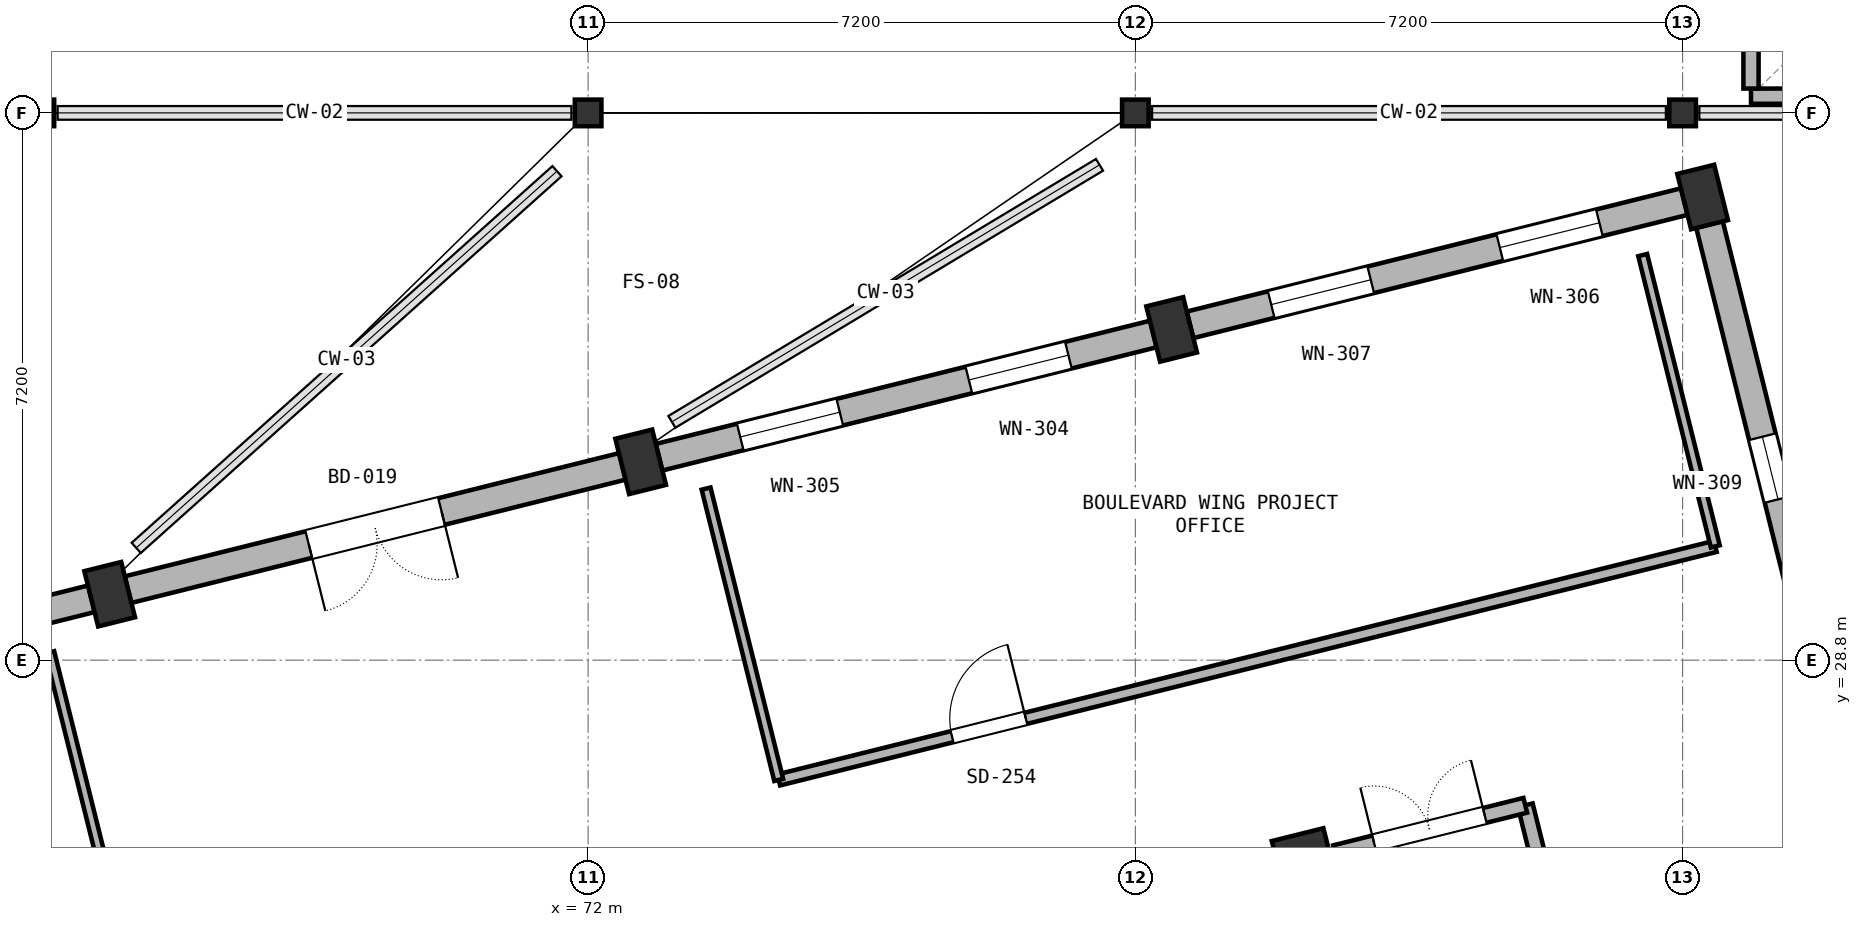
"""IFC4 building model, lengths in metres.
Left out: names, types, materials, properties, quantities, classifications, styles, units other than length and angle.
Written with IfcOpenShell. Run it as: python <this file> out.ifc"""

import sys

from ifc_helpers import new_model, si_unit, direction, frame, frame_2d, origin, origin_2d, place, context, subcontext, project, spatial, rectangle, i_section, extrude, element, fill, save


model = new_model("IFC4")
c1 = context("Model", 3, precision=1e-05, world=origin(), true_north=direction((0.0, 1.0)))
c2 = subcontext(c1, "Body", "Model", "MODEL_VIEW")
j1 = project(units=[si_unit("LENGTHUNIT", "METRE"), si_unit("PLANEANGLEUNIT", "RADIAN")], contexts=[c1])
p1 = place(None, origin())
s1 = spatial("IfcSite", under=j1, at=p1, CompositionType="ELEMENT")
p2 = place(p1, origin())
s2 = spatial("IfcBuilding", under=s1, at=p2, CompositionType="ELEMENT")
p3 = place(p2, frame((0.0, 0.0, 10.2)))
s3 = spatial("IfcBuildingStorey", under=s2, at=p3, CompositionType="ELEMENT", Elevation=10.2)
for number, where, z_axis, x_axis in (
    (1, (65.705, 29.667, 0.0), (0.0, 0.0, 1.0), (0.97, 0.242, 0.0)),
    (2, (72.691, 31.409, 0.0), (0.0, 0.0, 1.0), (0.97, 0.242, 0.0)),
):
    element("IfcColumn", number, at=place(p3, frame(where, z_axis=z_axis, x_axis=x_axis)), inside=s3, PredefinedType="COLUMN", context=c2, shape_type="SweptSolid", body=[
        extrude(rectangle(XDim=0.5, YDim=0.75, at=origin_2d()), origin(), (0.0, 0.0, 1.0), 4.2),
    ])
p4 = place(p3, frame((81.419, 26.165, 0.0), z_axis=(0.0, 0.0, 1.0), x_axis=(0.970295726276, 0.2419218956, 0.0)))
e3 = element("IfcColumn", 3, at=p4, inside=s3, PredefinedType="COLUMN", context=c2, shape_type="SweptSolid", body=[
    extrude(rectangle(XDim=0.7, YDim=0.7, at=origin_2d()), origin(), (0.0, 0.0, 1.0), 4.2),
])
for number, where, z_axis, x_axis in (
    (4, (79.677, 33.151, 0.0), (0.0, 0.0, 1.0), (0.97, 0.242, 0.0)),
    (5, (86.664, 34.893, 0.0), (0.0, 0.0, 1.0), (0.97, 0.242, 0.0)),
):
    element("IfcColumn", number, at=place(p3, frame(where, z_axis=z_axis, x_axis=x_axis)), inside=s3, PredefinedType="COLUMN", context=c2, shape_type="SweptSolid", body=[
        extrude(rectangle(XDim=0.5, YDim=0.75, at=origin_2d()), origin(), (0.0, 0.0, 1.0), 4.2),
    ])
for number, where, z_axis, x_axis in (
    (6, (64.8, 36.0, 0.0), (0.0, 0.0, 1.0), (1.0, 0.0, 0.0)),
    (7, (72.0, 36.0, 0.0), (0.0, 0.0, 1.0), (1.0, 0.0, 0.0)),
    (8, (79.2, 36.0, 0.0), (0.0, 0.0, 1.0), (1.0, 0.0, 0.0)),
    (9, (86.4, 36.0, 0.0), (0.0, 0.0, 1.0), (1.0, 0.0, 0.0)),
):
    element("IfcColumn", number, at=place(p3, frame(where, z_axis=z_axis, x_axis=x_axis)), inside=s3, PredefinedType="COLUMN", context=c2, shape_type="SweptSolid", body=[
        extrude(i_section(OverallWidth=0.35, OverallDepth=0.35, WebThickness=0.012, FlangeThickness=0.019, FilletRadius=0.02, at=origin_2d()), origin(), (0.0, 0.0, 1.0), 4.2),
    ])
p5 = place(p3, frame((92.7, 36.22, 0.0), z_axis=(0.0, 0.0, 1.0), x_axis=(-1.0, 0.0, 0.0)))
e10 = element("IfcWall", 10, at=p5, inside=s3, PredefinedType="PARTITIONING", context=c2, shape_type="SweptSolid", body=[
    extrude(rectangle(XDim=5.4, YDim=0.2, at=frame_2d((2.7, 0.0))), origin(), (0.0, 0.0, 1.0), 3.42),
])
p6 = place(p3, frame((87.3, 42.88, 0.0), z_axis=(0.0, 0.0, 1.0), x_axis=(0.0, -1.0, 0.0)))
e11 = element("IfcWall", 11, at=p6, inside=s3, PredefinedType="PARTITIONING", context=c2, shape_type="SweptSolid", body=[
    extrude(rectangle(XDim=6.56, YDim=0.2, at=frame_2d((3.28, 0.0))), origin(), (0.0, 0.0, 1.0), 3.42),
])
p7 = place(p3, frame((65.465, 29.608, 0.0), z_axis=(0.0, 0.0, 1.0), x_axis=(-0.970296540998, -0.241918627903, 0.0)))
e12 = element("IfcWall", 12, at=p7, inside=s3, PredefinedType="SOLIDWALL", context=c2, shape_type="SweptSolid", body=[
    extrude(rectangle(XDim=6.704, YDim=0.36, at=frame_2d((3.352, 0.0))), origin(), (0.0, 0.0, 1.0), 3.04),
])
p8 = place(p7, frame((1.152, 0.0, 0.65)))
e13 = element("IfcOpeningElement", 13, at=p8, cuts=e12, PredefinedType="OPENING", context=c2, shape_type="SweptSolid", body=[
    extrude(rectangle(XDim=1.35, YDim=2.15, at=frame_2d((0.675, 1.075))), frame((0.0, 0.19, 0.0), z_axis=(0.0, -1.0, 0.0), x_axis=(1.0, 0.0, 0.0)), (0.0, 0.0, 1.0), 0.38),
])
p9 = place(p7, frame((4.252, 0.0, 0.65)))
e14 = element("IfcOpeningElement", 14, at=p9, cuts=e12, PredefinedType="OPENING", context=c2, shape_type="SweptSolid", body=[
    extrude(rectangle(XDim=1.35, YDim=2.15, at=frame_2d((0.675, 1.075))), frame((0.0, 0.19, 0.0), z_axis=(0.0, -1.0, 0.0), x_axis=(1.0, 0.0, 0.0)), (0.0, 0.0, 1.0), 0.38),
])
p10 = place(p3, frame((72.451, 31.349, 0.0), z_axis=(0.0, 0.0, 1.0), x_axis=(-0.970296540998, -0.241918627903, 0.0)))
e15 = element("IfcWall", 15, at=p10, inside=s3, PredefinedType="SOLIDWALL", context=c2, shape_type="SweptSolid", body=[
    extrude(rectangle(XDim=6.704, YDim=0.36, at=frame_2d((3.352, 0.0))), origin(), (0.0, 0.0, 1.0), 2.58),
])
p11 = place(p10, frame((2.452, 0.0, 0.0)))
e16 = element("IfcOpeningElement", 16, at=p11, cuts=e15, PredefinedType="OPENING", context=c2, shape_type="SweptSolid", body=[
    extrude(rectangle(XDim=1.8, YDim=2.2, at=frame_2d((0.9, 1.1))), frame((0.0, 0.19, 0.0), z_axis=(0.0, -1.0, 0.0), x_axis=(1.0, 0.0, 0.0)), (0.0, 0.0, 1.0), 0.38),
])
p12 = place(p3, frame((79.437, 33.091, 0.0), z_axis=(0.0, 0.0, 1.0), x_axis=(-0.970296540998, -0.241918627903, 0.0)))
e17 = element("IfcWall", 17, at=p12, inside=s3, PredefinedType="SOLIDWALL", context=c2, shape_type="SweptSolid", body=[
    extrude(rectangle(XDim=6.704, YDim=0.36, at=frame_2d((3.352, 0.0))), origin(), (0.0, 0.0, 1.0), 3.04),
])
p13 = place(p12, frame((1.152, 0.0, 0.65)))
e18 = element("IfcOpeningElement", 18, at=p13, cuts=e17, PredefinedType="OPENING", context=c2, shape_type="SweptSolid", body=[
    extrude(rectangle(XDim=1.35, YDim=2.15, at=frame_2d((0.675, 1.075))), frame((0.0, 0.19, 0.0), z_axis=(0.0, -1.0, 0.0), x_axis=(1.0, 0.0, 0.0)), (0.0, 0.0, 1.0), 0.38),
])
p14 = place(p12, frame((4.252, 0.0, 0.65)))
e19 = element("IfcOpeningElement", 19, at=p14, cuts=e17, PredefinedType="OPENING", context=c2, shape_type="SweptSolid", body=[
    extrude(rectangle(XDim=1.35, YDim=2.15, at=frame_2d((0.675, 1.075))), frame((0.0, 0.19, 0.0), z_axis=(0.0, -1.0, 0.0), x_axis=(1.0, 0.0, 0.0)), (0.0, 0.0, 1.0), 0.38),
])
p15 = place(p3, frame((86.423, 34.833, 0.0), z_axis=(0.0, 0.0, 1.0), x_axis=(-0.970296540998, -0.241918627903, 0.0)))
e20 = element("IfcWall", 20, at=p15, inside=s3, PredefinedType="SOLIDWALL", context=c2, shape_type="SweptSolid", body=[
    extrude(rectangle(XDim=6.704, YDim=0.36, at=frame_2d((3.352, 0.0))), origin(), (0.0, 0.0, 1.0), 3.04),
])
p16 = place(p15, frame((1.152, 0.0, 0.65)))
e21 = element("IfcOpeningElement", 21, at=p16, cuts=e20, PredefinedType="OPENING", context=c2, shape_type="SweptSolid", body=[
    extrude(rectangle(XDim=1.35, YDim=2.15, at=frame_2d((0.675, 1.075))), frame((0.0, 0.19, 0.0), z_axis=(0.0, -1.0, 0.0), x_axis=(1.0, 0.0, 0.0)), (0.0, 0.0, 1.0), 0.38),
])
p17 = place(p15, frame((4.252, 0.0, 0.65)))
e22 = element("IfcOpeningElement", 22, at=p17, cuts=e20, PredefinedType="OPENING", context=c2, shape_type="SweptSolid", body=[
    extrude(rectangle(XDim=1.35, YDim=2.15, at=frame_2d((0.675, 1.075))), frame((0.0, 0.19, 0.0), z_axis=(0.0, -1.0, 0.0), x_axis=(1.0, 0.0, 0.0)), (0.0, 0.0, 1.0), 0.38),
])
p18 = place(p3, frame((88.315, 28.269, 0.0), z_axis=(0.0, 0.0, 1.0), x_axis=(-0.241939253206, 0.970291398374, 0.0)))
e23 = element("IfcWall", 23, at=p18, inside=s3, PredefinedType="SOLIDWALL", context=c2, shape_type="SweptSolid", body=[
    extrude(rectangle(XDim=6.454, YDim=0.36, at=frame_2d((3.227, 0.0))), origin(), (0.0, 0.0, 1.0), 3.04),
])
p19 = place(p18, frame((2.727, 0.0, 0.7)))
e24 = element("IfcOpeningElement", 24, at=p19, cuts=e23, PredefinedType="OPENING", context=c2, shape_type="SweptSolid", body=[
    extrude(rectangle(XDim=0.85, YDim=2.19, at=frame_2d((0.425, 1.095))), frame((0.0, 0.19, 0.0), z_axis=(0.0, -1.0, 0.0), x_axis=(1.0, 0.0, 0.0)), (0.0, 0.0, 1.0), 0.38),
])
p20 = place(p3, frame((86.072, 19.905, 0.0), z_axis=(0.0, 0.0, 1.0), x_axis=(-0.241937193493, 0.970291911955, 0.0)))
e25 = element("IfcWall", 25, at=p20, inside=s3, PredefinedType="PARTITIONING", context=c2, shape_type="SweptSolid", body=[
    extrude(rectangle(XDim=7.2, YDim=0.2, at=frame_2d((3.6, 0.0))), origin(), (0.0, 0.0, 1.0), 3.08),
])
p21 = place(p3, frame((84.33, 26.891, 0.0), z_axis=(0.0, 0.0, 1.0), x_axis=(-0.970309259708, -0.2418676095, 0.0)))
e26 = element("IfcWall", 26, at=p21, inside=s3, PredefinedType="PARTITIONING", context=c2, shape_type="SweptSolid", body=[
    extrude(rectangle(XDim=2.58, YDim=0.2, at=frame_2d((1.29, 0.0))), origin(), (0.0, 0.0, 1.0), 3.08),
])
p22 = place(p21, frame((0.55, 0.0, 0.0)))
e27 = element("IfcOpeningElement", 27, at=p22, cuts=e26, PredefinedType="OPENING", context=c2, shape_type="SweptSolid", body=[
    extrude(rectangle(XDim=1.5, YDim=2.2, at=frame_2d((0.75, 1.1))), frame((0.0, 0.11, 0.0), z_axis=(0.0, -1.0, 0.0), x_axis=(1.0, 0.0, 0.0)), (0.0, 0.0, 1.0), 0.22),
])
p23 = place(p3, frame((64.917, 28.904, 0.0), z_axis=(0.0, 0.0, 1.0), x_axis=(0.241924747697, -0.970295015164, 0.0)))
e28 = element("IfcWall", 28, at=p23, inside=s3, PredefinedType="PARTITIONING", context=c2, shape_type="SweptSolid", body=[
    extrude(rectangle(XDim=3.95, YDim=0.12, at=frame_2d((1.975, 0.0))), origin(), (0.0, 0.0, 1.0), 3.08),
])
p24 = place(p3, frame((74.508, 27.225, 0.0), z_axis=(0.0, 0.0, 1.0), x_axis=(0.970298350757, 0.241911369139, 0.0)))
e29 = element("IfcWall", 29, at=p24, inside=s3, PredefinedType="PARTITIONING", context=c2, shape_type="SweptSolid", body=[
    extrude(rectangle(XDim=12.7, YDim=0.15, at=frame_2d((6.35, 0.0))), origin(), (0.0, 0.0, 1.0), 3.08),
])
p25 = place(p24, frame((2.35, 0.0, 0.0)))
e30 = element("IfcOpeningElement", 30, at=p25, cuts=e29, PredefinedType="OPENING", context=c2, shape_type="SweptSolid", body=[
    extrude(rectangle(XDim=1.0, YDim=2.15, at=frame_2d((0.5, 1.075))), frame((0.0, 0.085, 0.0), z_axis=(0.0, -1.0, 0.0), x_axis=(1.0, 0.0, 0.0)), (0.0, 0.0, 1.0), 0.17),
])
p26 = place(p3, frame((74.508, 27.225, 0.0), z_axis=(0.0, 0.0, 1.0), x_axis=(-0.241924747697, 0.970295015164, 0.0)))
e31 = element("IfcWall", 31, at=p26, inside=s3, PredefinedType="PARTITIONING", context=c2, shape_type="SweptSolid", body=[
    extrude(rectangle(XDim=3.95, YDim=0.12, at=frame_2d((1.975, 0.0))), origin(), (0.0, 0.0, 1.0), 3.08),
])
p27 = place(p3, frame((85.875, 34.13, 0.0), z_axis=(0.0, 0.0, 1.0), x_axis=(0.241910239337, -0.970298632434, 0.0)))
e32 = element("IfcWall", 32, at=p27, inside=s3, PredefinedType="PARTITIONING", context=c2, shape_type="SweptSolid", body=[
    extrude(rectangle(XDim=3.95, YDim=0.12, at=frame_2d((1.975, 0.0))), origin(), (0.0, 0.0, 1.0), 3.08),
])
p28 = place(p11, origin())
e33 = element("IfcDoor", 33, at=p28, inside=s3, OperationType="DOUBLE_DOOR_SINGLE_SWING", PredefinedType="DOOR", context=c2, shape_type="SweptSolid", body=[
    extrude(rectangle(XDim=1.8, YDim=2.2, at=frame_2d((0.9, 1.1))), frame((0.0, 0.025, 0.0), z_axis=(0.0, -1.0, 0.0), x_axis=(1.0, 0.0, 0.0)), (0.0, 0.0, 1.0), 0.05),
])
fill(e16, e33)
p29 = place(p13, origin())
e34 = element("IfcWindow", 34, at=p29, inside=s3, PartitioningType="DOUBLE_PANEL_VERTICAL", PredefinedType="WINDOW", context=c2, shape_type="SweptSolid", body=[
    extrude(rectangle(XDim=1.35, YDim=2.15, at=frame_2d((0.675, 1.075))), frame((0.0, 0.03, 0.0), z_axis=(0.0, -1.0, 0.0), x_axis=(1.0, 0.0, 0.0)), (0.0, 0.0, 1.0), 0.06),
])
fill(e18, e34)
p30 = place(p14, origin())
e35 = element("IfcWindow", 35, at=p30, inside=s3, PartitioningType="DOUBLE_PANEL_VERTICAL", PredefinedType="WINDOW", context=c2, shape_type="SweptSolid", body=[
    extrude(rectangle(XDim=1.35, YDim=2.15, at=frame_2d((0.675, 1.075))), frame((0.0, 0.03, 0.0), z_axis=(0.0, -1.0, 0.0), x_axis=(1.0, 0.0, 0.0)), (0.0, 0.0, 1.0), 0.06),
])
fill(e19, e35)
p31 = place(p16, origin())
e36 = element("IfcWindow", 36, at=p31, inside=s3, PartitioningType="DOUBLE_PANEL_VERTICAL", PredefinedType="WINDOW", context=c2, shape_type="SweptSolid", body=[
    extrude(rectangle(XDim=1.35, YDim=2.15, at=frame_2d((0.675, 1.075))), frame((0.0, 0.03, 0.0), z_axis=(0.0, -1.0, 0.0), x_axis=(1.0, 0.0, 0.0)), (0.0, 0.0, 1.0), 0.06),
])
fill(e21, e36)
p32 = place(p17, origin())
e37 = element("IfcWindow", 37, at=p32, inside=s3, PartitioningType="DOUBLE_PANEL_VERTICAL", PredefinedType="WINDOW", context=c2, shape_type="SweptSolid", body=[
    extrude(rectangle(XDim=1.35, YDim=2.15, at=frame_2d((0.675, 1.075))), frame((0.0, 0.03, 0.0), z_axis=(0.0, -1.0, 0.0), x_axis=(1.0, 0.0, 0.0)), (0.0, 0.0, 1.0), 0.06),
])
fill(e22, e37)
p33 = place(p19, origin())
e38 = element("IfcWindow", 38, at=p33, inside=s3, PartitioningType="SINGLE_PANEL", PredefinedType="WINDOW", context=c2, shape_type="SweptSolid", body=[
    extrude(rectangle(XDim=0.85, YDim=2.19, at=frame_2d((0.425, 1.095))), frame((0.0, 0.03, 0.0), z_axis=(0.0, -1.0, 0.0), x_axis=(1.0, 0.0, 0.0)), (0.0, 0.0, 1.0), 0.06),
])
fill(e24, e38)
p34 = place(p22, frame((1.5, 0.0, 0.0), z_axis=(0.0, 0.0, 1.0), x_axis=(-1.0, 0.0, 0.0)))
e39 = element("IfcDoor", 39, at=p34, inside=s3, OperationType="DOUBLE_DOOR_SINGLE_SWING", PredefinedType="DOOR", context=c2, shape_type="SweptSolid", body=[
    extrude(rectangle(XDim=1.5, YDim=2.2, at=frame_2d((0.75, 1.1))), frame((0.0, 0.025, 0.0), z_axis=(0.0, -1.0, 0.0), x_axis=(1.0, 0.0, 0.0)), (0.0, 0.0, 1.0), 0.05),
])
fill(e27, e39)
p35 = place(p25, origin())
e40 = element("IfcDoor", 40, at=p35, inside=s3, OperationType="SINGLE_SWING_RIGHT", PredefinedType="DOOR", context=c2, shape_type="SweptSolid", body=[
    extrude(rectangle(XDim=1.0, YDim=2.15, at=frame_2d((0.5, 1.075))), frame((0.0, 0.025, 0.0), z_axis=(0.0, -1.0, 0.0), x_axis=(1.0, 0.0, 0.0)), (0.0, 0.0, 1.0), 0.05),
])
fill(e30, e40)
save(model, sys.argv[1])
